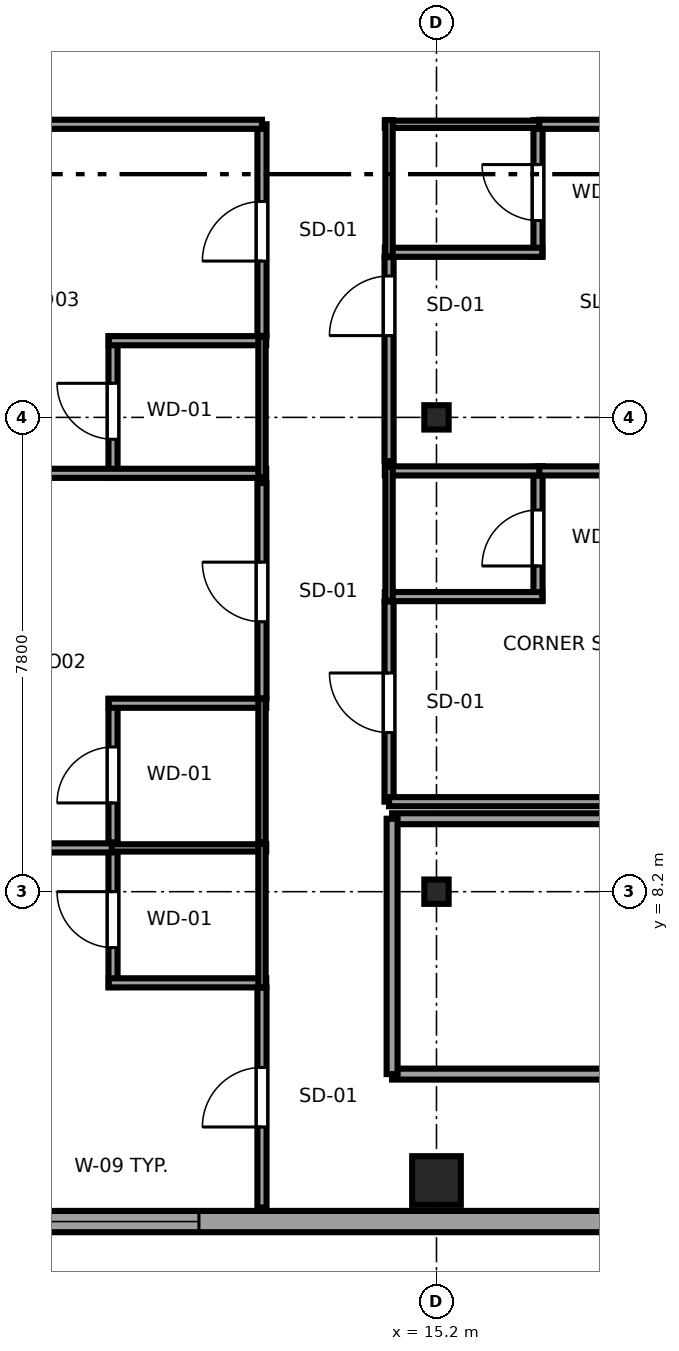
"""IFC4 building model, lengths in metres.
Left out: names, types, materials, properties, quantities, classifications, styles, units other than length and angle.
Written with IfcOpenShell. Run it as: python <this file> out.ifc"""

import sys

from ifc_helpers import new_model, si_unit, direction, frame, frame_2d, origin, origin_2d, place, context, subcontext, project, spatial, rectangle, i_section, extrude, source, transform, mapped, element, fill, save


model = new_model("IFC4")
c1 = context("Model", 3, precision=1e-05, world=origin(), true_north=direction((0.0, 1.0)))
c2 = subcontext(c1, "Body", "Model", "MODEL_VIEW")
j1 = project(units=[si_unit("LENGTHUNIT", "METRE"), si_unit("PLANEANGLEUNIT", "RADIAN")], contexts=[c1])
p1 = place(None, origin())
s1 = spatial("IfcSite", under=j1, at=p1, CompositionType="ELEMENT")
p2 = place(p1, origin())
s2 = spatial("IfcBuilding", under=s1, at=p2, CompositionType="ELEMENT")
p3 = place(p2, frame((0.0, 0.0, 171.9)))
s3 = spatial("IfcBuildingStorey", under=s2, at=p3, CompositionType="ELEMENT", Elevation=171.9)
m1 = source(origin(), c2, "Body", "SweptSolid", [
    extrude(rectangle(XDim=0.8, YDim=0.8, at=origin_2d()), origin(), (0.0, 0.0, 1.0), 3.55),
])
p4 = place(p3, frame((15.2, 3.45, 0.0), z_axis=(0.0, 0.0, 1.0), x_axis=(1.0, 0.0, 0.0)))
e1 = element("IfcColumn", 1, at=p4, inside=s3, PredefinedType="COLUMN", context=c2, shape_type="MappedRepresentation", body=[
    mapped(m1, transform((0.0, 0.0, 0.0), x_axis=(1.0, 0.0, 0.0), y_axis=(0.0, 1.0, 0.0), z_axis=(0.0, 0.0, 1.0), scale=1.0)),
])
m2 = source(origin(), c2, "Body", "SweptSolid", [
    extrude(i_section(OverallWidth=0.4, OverallDepth=0.4, WebThickness=0.02, FlangeThickness=0.035, at=origin_2d()), origin(), (0.0, 0.0, 1.0), 3.55),
])
for number, where, z_axis, x_axis in (
    (2, (15.2, 8.2, 0.0), (0.0, 0.0, 1.0), (1.0, 0.0, 0.0)),
    (3, (15.2, 16.0, 0.0), (0.0, 0.0, 1.0), (1.0, 0.0, 0.0)),
):
    element("IfcColumn", number, at=place(p3, frame(where, z_axis=z_axis, x_axis=x_axis)), inside=s3, PredefinedType="COLUMN", context=c2, shape_type="MappedRepresentation", body=[
        mapped(m2, transform((0.0, 0.0, 0.0), x_axis=(1.0, 0.0, 0.0), y_axis=(0.0, 1.0, 0.0), z_axis=(0.0, 0.0, 1.0), scale=1.0)),
    ])
p5 = place(p3, frame((7.017, 2.775, 0.0), z_axis=(0.0, 0.0, 1.0), x_axis=(1.0, 0.0, 0.0)))
e4 = element("IfcWall", 4, at=p5, inside=s3, PredefinedType="SOLIDWALL", context=c2, shape_type="SweptSolid", body=[
    extrude(rectangle(XDim=15.608, YDim=0.35, at=frame_2d((7.804, 0.0))), origin(), (0.0, 0.0, 1.0), 3.37),
])
p6 = place(p5, frame((1.726, 0.0, 0.68)))
e5 = element("IfcOpeningElement", 5, at=p6, cuts=e4, PredefinedType="OPENING", context=c2, shape_type="SweptSolid", body=[
    extrude(rectangle(XDim=2.55, YDim=1.92, at=frame_2d((1.275, 0.96))), frame((0.0, 0.185, 0.0), z_axis=(0.0, -1.0, 0.0), x_axis=(1.0, 0.0, 0.0)), (0.0, 0.0, 1.0), 0.37),
])
p7 = place(p5, frame((11.332, 0.0, 0.68)))
e6 = element("IfcOpeningElement", 6, at=p7, cuts=e4, PredefinedType="OPENING", context=c2, shape_type="SweptSolid", body=[
    extrude(rectangle(XDim=2.55, YDim=1.92, at=frame_2d((1.275, 0.96))), frame((0.0, 0.185, 0.0), z_axis=(0.0, -1.0, 0.0), x_axis=(1.0, 0.0, 0.0)), (0.0, 0.0, 1.0), 0.37),
])
p8 = place(p3, frame((9.88, 6.631, 0.0), z_axis=(0.0, 0.0, 1.0), x_axis=(0.0, 1.0, 0.0)))
e7 = element("IfcWall", 7, at=p8, inside=s3, PredefinedType="PARTITIONING", context=c2, shape_type="SweptSolid", body=[
    extrude(rectangle(XDim=2.359, YDim=0.15, at=frame_2d((1.179, 0.0))), origin(), (0.0, 0.0, 1.0), 3.37),
])
p9 = place(p8, frame((0.649, 0.0, 0.0)))
e8 = element("IfcOpeningElement", 8, at=p9, cuts=e7, PredefinedType="OPENING", context=c2, shape_type="SweptSolid", body=[
    extrude(rectangle(XDim=0.92, YDim=2.01, at=frame_2d((0.46, 1.005))), frame((0.0, 0.085, 0.0), z_axis=(0.0, -1.0, 0.0), x_axis=(1.0, 0.0, 0.0)), (0.0, 0.0, 1.0), 0.17),
])
p10 = place(p3, frame((9.81, 6.701, 0.0), z_axis=(0.0, 0.0, 1.0), x_axis=(1.0, 0.0, 0.0)))
e9 = element("IfcWall", 9, at=p10, inside=s3, PredefinedType="PARTITIONING", context=c2, shape_type="SweptSolid", body=[
    extrude(rectangle(XDim=2.59, YDim=0.15, at=frame_2d((1.295, 0.0))), origin(), (0.0, 0.0, 1.0), 3.37),
])
p11 = place(p3, frame((9.81, 8.92, 0.0), z_axis=(0.0, 0.0, 1.0), x_axis=(1.0, 0.0, 0.0)))
e10 = element("IfcWall", 10, at=p11, inside=s3, PredefinedType="PLUMBINGWALL", context=c2, shape_type="SweptSolid", body=[
    extrude(rectangle(XDim=2.59, YDim=0.12, at=frame_2d((1.295, 0.0))), origin(), (0.0, 0.0, 1.0), 3.37),
])
p12 = place(p3, frame((12.33, 6.631, 0.0), z_axis=(0.0, 0.0, 1.0), x_axis=(0.0, 1.0, 0.0)))
e11 = element("IfcWall", 11, at=p12, inside=s3, PredefinedType="PLUMBINGWALL", context=c2, shape_type="SweptSolid", body=[
    extrude(rectangle(XDim=2.359, YDim=0.12, at=frame_2d((1.179, 0.0))), origin(), (0.0, 0.0, 1.0), 3.37),
])
p13 = place(p3, frame((9.88, 9.01, 0.0), z_axis=(0.0, 0.0, 1.0), x_axis=(0.0, 1.0, 0.0)))
e12 = element("IfcWall", 12, at=p13, inside=s3, PredefinedType="PARTITIONING", context=c2, shape_type="SweptSolid", body=[
    extrude(rectangle(XDim=2.359, YDim=0.15, at=frame_2d((1.179, 0.0))), origin(), (0.0, 0.0, 1.0), 3.37),
])
p14 = place(p13, frame((0.649, 0.0, 0.0)))
e13 = element("IfcOpeningElement", 13, at=p14, cuts=e12, PredefinedType="OPENING", context=c2, shape_type="SweptSolid", body=[
    extrude(rectangle(XDim=0.92, YDim=2.01, at=frame_2d((0.46, 1.005))), frame((0.0, 0.085, 0.0), z_axis=(0.0, -1.0, 0.0), x_axis=(1.0, 0.0, 0.0)), (0.0, 0.0, 1.0), 0.17),
])
p15 = place(p3, frame((9.81, 11.299, 0.0), z_axis=(0.0, 0.0, 1.0), x_axis=(1.0, 0.0, 0.0)))
e14 = element("IfcWall", 14, at=p15, inside=s3, PredefinedType="PARTITIONING", context=c2, shape_type="SweptSolid", body=[
    extrude(rectangle(XDim=2.59, YDim=0.15, at=frame_2d((1.295, 0.0))), origin(), (0.0, 0.0, 1.0), 3.37),
])
p16 = place(p3, frame((12.33, 9.01, 0.0), z_axis=(0.0, 0.0, 1.0), x_axis=(0.0, 1.0, 0.0)))
e15 = element("IfcWall", 15, at=p16, inside=s3, PredefinedType="PLUMBINGWALL", context=c2, shape_type="SweptSolid", body=[
    extrude(rectangle(XDim=2.359, YDim=0.12, at=frame_2d((1.179, 0.0))), origin(), (0.0, 0.0, 1.0), 3.37),
])
p17 = place(p3, frame((9.88, 15.01, 0.0), z_axis=(0.0, 0.0, 1.0), x_axis=(0.0, 1.0, 0.0)))
e16 = element("IfcWall", 16, at=p17, inside=s3, PredefinedType="PARTITIONING", context=c2, shape_type="SweptSolid", body=[
    extrude(rectangle(XDim=2.321, YDim=0.15, at=frame_2d((1.161, 0.0))), origin(), (0.0, 0.0, 1.0), 3.37),
])
p18 = place(p17, frame((0.631, 0.0, 0.0)))
e17 = element("IfcOpeningElement", 17, at=p18, cuts=e16, PredefinedType="OPENING", context=c2, shape_type="SweptSolid", body=[
    extrude(rectangle(XDim=0.92, YDim=2.01, at=frame_2d((0.46, 1.005))), frame((0.0, 0.085, 0.0), z_axis=(0.0, -1.0, 0.0), x_axis=(1.0, 0.0, 0.0)), (0.0, 0.0, 1.0), 0.17),
])
p19 = place(p3, frame((3.005, 15.08, 0.0), z_axis=(0.0, 0.0, 1.0), x_axis=(1.0, 0.0, 0.0)))
e18 = element("IfcWall", 18, at=p19, inside=s3, PredefinedType="PARTITIONING", context=c2, shape_type="SweptSolid", body=[
    extrude(rectangle(XDim=9.395, YDim=0.15, at=frame_2d((4.698, 0.0))), origin(), (0.0, 0.0, 1.0), 3.37),
])
p20 = place(p3, frame((9.81, 17.261, 0.0), z_axis=(0.0, 0.0, 1.0), x_axis=(1.0, 0.0, 0.0)))
e19 = element("IfcWall", 19, at=p20, inside=s3, PredefinedType="PARTITIONING", context=c2, shape_type="SweptSolid", body=[
    extrude(rectangle(XDim=2.59, YDim=0.15, at=frame_2d((1.295, 0.0))), origin(), (0.0, 0.0, 1.0), 3.37),
])
p21 = place(p3, frame((12.33, 15.01, 0.0), z_axis=(0.0, 0.0, 1.0), x_axis=(0.0, 1.0, 0.0)))
e20 = element("IfcWall", 20, at=p21, inside=s3, PredefinedType="PLUMBINGWALL", context=c2, shape_type="SweptSolid", body=[
    extrude(rectangle(XDim=2.321, YDim=0.12, at=frame_2d((1.161, 0.0))), origin(), (0.0, 0.0, 1.0), 3.37),
])
p22 = place(p3, frame((16.87, 12.983, 0.0), z_axis=(0.0, 0.0, 1.0), x_axis=(0.0, 1.0, 0.0)))
e21 = element("IfcWall", 21, at=p22, inside=s3, PredefinedType="PARTITIONING", context=c2, shape_type="SweptSolid", body=[
    extrude(rectangle(XDim=2.207, YDim=0.15, at=frame_2d((1.104, 0.0))), origin(), (0.0, 0.0, 1.0), 3.37),
])
p23 = place(p22, frame((0.573, 0.0, 0.0)))
e22 = element("IfcOpeningElement", 22, at=p23, cuts=e21, PredefinedType="OPENING", context=c2, shape_type="SweptSolid", body=[
    extrude(rectangle(XDim=0.92, YDim=2.01, at=frame_2d((0.46, 1.005))), frame((0.0, 0.085, 0.0), z_axis=(0.0, -1.0, 0.0), x_axis=(1.0, 0.0, 0.0)), (0.0, 0.0, 1.0), 0.17),
])
for number, where, z_axis, x_axis in (
    (23, (14.35, 13.053, 0.0), (0.0, 0.0, 1.0), (1.0, 0.0, 0.0)),
    (24, (14.35, 15.12, 0.0), (0.0, 0.0, 1.0), (1.0, 0.0, 0.0)),
):
    element("IfcWall", number, at=place(p3, frame(where, z_axis=z_axis, x_axis=x_axis)), inside=s3, PredefinedType="PARTITIONING", context=c2, shape_type="SweptSolid", body=[
        extrude(rectangle(XDim=2.59, YDim=0.15, at=frame_2d((1.295, 0.0))), origin(), (0.0, 0.0, 1.0), 3.37),
    ])
p24 = place(p3, frame((14.42, 12.983, 0.0), z_axis=(0.0, 0.0, 1.0), x_axis=(0.0, 1.0, 0.0)))
e25 = element("IfcWall", 25, at=p24, inside=s3, PredefinedType="PLUMBINGWALL", context=c2, shape_type="SweptSolid", body=[
    extrude(rectangle(XDim=2.207, YDim=0.12, at=frame_2d((1.104, 0.0))), origin(), (0.0, 0.0, 1.0), 3.37),
])
p25 = place(p3, frame((16.87, 18.645, 0.0), z_axis=(0.0, 0.0, 1.0), x_axis=(0.0, 1.0, 0.0)))
e26 = element("IfcWall", 26, at=p25, inside=s3, PredefinedType="PARTITIONING", context=c2, shape_type="SweptSolid", body=[
    extrude(rectangle(XDim=2.245, YDim=0.15, at=frame_2d((1.123, 0.0))), origin(), (0.0, 0.0, 1.0), 3.37),
])
p26 = place(p25, frame((0.593, 0.0, 0.0)))
e27 = element("IfcOpeningElement", 27, at=p26, cuts=e26, PredefinedType="OPENING", context=c2, shape_type="SweptSolid", body=[
    extrude(rectangle(XDim=0.92, YDim=2.01, at=frame_2d((0.46, 1.005))), frame((0.0, 0.085, 0.0), z_axis=(0.0, -1.0, 0.0), x_axis=(1.0, 0.0, 0.0)), (0.0, 0.0, 1.0), 0.17),
])
p27 = place(p3, frame((14.35, 18.715, 0.0), z_axis=(0.0, 0.0, 1.0), x_axis=(1.0, 0.0, 0.0)))
e28 = element("IfcWall", 28, at=p27, inside=s3, PredefinedType="PARTITIONING", context=c2, shape_type="SweptSolid", body=[
    extrude(rectangle(XDim=2.59, YDim=0.15, at=frame_2d((1.295, 0.0))), origin(), (0.0, 0.0, 1.0), 3.37),
])
p28 = place(p3, frame((14.35, 20.82, 0.0), z_axis=(0.0, 0.0, 1.0), x_axis=(1.0, 0.0, 0.0)))
e29 = element("IfcWall", 29, at=p28, inside=s3, PredefinedType="PLUMBINGWALL", context=c2, shape_type="SweptSolid", body=[
    extrude(rectangle(XDim=2.59, YDim=0.12, at=frame_2d((1.295, 0.0))), origin(), (0.0, 0.0, 1.0), 3.37),
])
p29 = place(p3, frame((14.42, 18.645, 0.0), z_axis=(0.0, 0.0, 1.0), x_axis=(0.0, 1.0, 0.0)))
e30 = element("IfcWall", 30, at=p29, inside=s3, PredefinedType="PLUMBINGWALL", context=c2, shape_type="SweptSolid", body=[
    extrude(rectangle(XDim=2.245, YDim=0.12, at=frame_2d((1.123, 0.0))), origin(), (0.0, 0.0, 1.0), 3.37),
])
p30 = place(p3, frame((12.33, 3.005, 0.0), z_axis=(0.0, 0.0, 1.0), x_axis=(0.0, 1.0, 0.0)))
e31 = element("IfcWall", 31, at=p30, inside=s3, PredefinedType="PARTITIONING", context=c2, shape_type="SweptSolid", body=[
    extrude(rectangle(XDim=3.616, YDim=0.15, at=frame_2d((1.808, 0.0))), origin(), (0.0, 0.0, 1.0), 3.37),
])
p31 = place(p30, frame((1.325, 0.0, 0.0)))
e32 = element("IfcOpeningElement", 32, at=p31, cuts=e31, PredefinedType="OPENING", context=c2, shape_type="SweptSolid", body=[
    extrude(rectangle(XDim=0.98, YDim=2.12, at=frame_2d((0.49, 1.06))), frame((0.0, 0.085, 0.0), z_axis=(0.0, -1.0, 0.0), x_axis=(1.0, 0.0, 0.0)), (0.0, 0.0, 1.0), 0.17),
])
p32 = place(p3, frame((3.005, 8.92, 0.0), z_axis=(0.0, 0.0, 1.0), x_axis=(1.0, 0.0, 0.0)))
e33 = element("IfcWall", 33, at=p32, inside=s3, PredefinedType="PARTITIONING", context=c2, shape_type="SweptSolid", body=[
    extrude(rectangle(XDim=6.855, YDim=0.15, at=frame_2d((3.428, 0.0))), origin(), (0.0, 0.0, 1.0), 3.37),
])
p33 = place(p3, frame((12.33, 11.379, 0.0), z_axis=(0.0, 0.0, 1.0), x_axis=(0.0, 1.0, 0.0)))
e34 = element("IfcWall", 34, at=p33, inside=s3, PredefinedType="PARTITIONING", context=c2, shape_type="SweptSolid", body=[
    extrude(rectangle(XDim=3.541, YDim=0.15, at=frame_2d((1.771, 0.0))), origin(), (0.0, 0.0, 1.0), 3.37),
])
p34 = place(p33, frame((1.26, 0.0, 0.0)))
e35 = element("IfcOpeningElement", 35, at=p34, cuts=e34, PredefinedType="OPENING", context=c2, shape_type="SweptSolid", body=[
    extrude(rectangle(XDim=0.98, YDim=2.12, at=frame_2d((0.49, 1.06))), frame((0.0, 0.085, 0.0), z_axis=(0.0, -1.0, 0.0), x_axis=(1.0, 0.0, 0.0)), (0.0, 0.0, 1.0), 0.17),
])
p35 = place(p3, frame((12.33, 17.341, 0.0), z_axis=(0.0, 0.0, 1.0), x_axis=(0.0, 1.0, 0.0)))
e36 = element("IfcWall", 36, at=p35, inside=s3, PredefinedType="PARTITIONING", context=c2, shape_type="SweptSolid", body=[
    extrude(rectangle(XDim=3.479, YDim=0.15, at=frame_2d((1.74, 0.0))), origin(), (0.0, 0.0, 1.0), 3.37),
])
p36 = place(p35, frame((1.229, 0.0, 0.0)))
e37 = element("IfcOpeningElement", 37, at=p36, cuts=e36, PredefinedType="OPENING", context=c2, shape_type="SweptSolid", body=[
    extrude(rectangle(XDim=0.98, YDim=2.12, at=frame_2d((0.49, 1.06))), frame((0.0, 0.085, 0.0), z_axis=(0.0, -1.0, 0.0), x_axis=(1.0, 0.0, 0.0)), (0.0, 0.0, 1.0), 0.17),
])
p37 = place(p3, frame((3.005, 20.82, 0.0), z_axis=(0.0, 0.0, 1.0), x_axis=(1.0, 0.0, 0.0)))
e38 = element("IfcWall", 38, at=p37, inside=s3, PredefinedType="PARTITIONING", context=c2, shape_type="SweptSolid", body=[
    extrude(rectangle(XDim=9.325, YDim=0.15, at=frame_2d((4.663, 0.0))), origin(), (0.0, 0.0, 1.0), 3.37),
])
p38 = place(p3, frame((14.42, 9.68, 0.0), z_axis=(0.0, 0.0, 1.0), x_axis=(0.0, 1.0, 0.0)))
e39 = element("IfcWall", 39, at=p38, inside=s3, PredefinedType="PARTITIONING", context=c2, shape_type="SweptSolid", body=[
    extrude(rectangle(XDim=3.293, YDim=0.15, at=frame_2d((1.646, 0.0))), origin(), (0.0, 0.0, 1.0), 3.37),
])
p39 = place(p38, frame((1.136, 0.0, 0.0)))
e40 = element("IfcOpeningElement", 40, at=p39, cuts=e39, PredefinedType="OPENING", context=c2, shape_type="SweptSolid", body=[
    extrude(rectangle(XDim=0.98, YDim=2.12, at=frame_2d((0.49, 1.06))), frame((0.0, 0.085, 0.0), z_axis=(0.0, -1.0, 0.0), x_axis=(1.0, 0.0, 0.0)), (0.0, 0.0, 1.0), 0.17),
])
p40 = place(p3, frame((14.42, 9.68, 0.0), z_axis=(0.0, 0.0, 1.0), x_axis=(1.0, 0.0, 0.0)))
e41 = element("IfcWall", 41, at=p40, inside=s3, PredefinedType="PARTITIONING", context=c2, shape_type="SweptSolid", body=[
    extrude(rectangle(XDim=7.93, YDim=0.15, at=frame_2d((3.965, 0.0))), origin(), (0.0, 0.0, 1.0), 3.37),
])
p41 = place(p3, frame((16.89, 15.12, 0.0), z_axis=(0.0, 0.0, 1.0), x_axis=(1.0, 0.0, 0.0)))
e42 = element("IfcWall", 42, at=p41, inside=s3, PredefinedType="PARTITIONING", context=c2, shape_type="SweptSolid", body=[
    extrude(rectangle(XDim=5.46, YDim=0.15, at=frame_2d((2.73, 0.0))), origin(), (0.0, 0.0, 1.0), 3.37),
])
p42 = place(p3, frame((14.42, 15.28, 0.0), z_axis=(0.0, 0.0, 1.0), x_axis=(0.0, 1.0, 0.0)))
e43 = element("IfcWall", 43, at=p42, inside=s3, PredefinedType="PARTITIONING", context=c2, shape_type="SweptSolid", body=[
    extrude(rectangle(XDim=3.355, YDim=0.15, at=frame_2d((1.677, 0.0))), origin(), (0.0, 0.0, 1.0), 3.37),
])
p43 = place(p42, frame((2.065, 0.0, 0.0)))
e44 = element("IfcOpeningElement", 44, at=p43, cuts=e43, PredefinedType="OPENING", context=c2, shape_type="SweptSolid", body=[
    extrude(rectangle(XDim=0.98, YDim=2.12, at=frame_2d((0.49, 1.06))), frame((0.0, 0.085, 0.0), z_axis=(0.0, -1.0, 0.0), x_axis=(1.0, 0.0, 0.0)), (0.0, 0.0, 1.0), 0.17),
])
p44 = place(p3, frame((16.89, 20.82, 0.0), z_axis=(0.0, 0.0, 1.0), x_axis=(1.0, 0.0, 0.0)))
e45 = element("IfcWall", 45, at=p44, inside=s3, PredefinedType="PARTITIONING", context=c2, shape_type="SweptSolid", body=[
    extrude(rectangle(XDim=5.46, YDim=0.15, at=frame_2d((2.73, 0.0))), origin(), (0.0, 0.0, 1.0), 3.37),
])
for number, where, z_axis, x_axis in (
    (46, (14.47, 5.2, 0.0), (0.0, 0.0, 1.0), (1.0, 0.0, 0.0)),
    (47, (14.47, 9.4, 0.0), (0.0, 0.0, 1.0), (1.0, 0.0, 0.0)),
):
    element("IfcWall", number, at=place(p3, frame(where, z_axis=z_axis, x_axis=x_axis)), inside=s3, PredefinedType="PARTITIONING", context=c2, shape_type="SweptSolid", body=[
        extrude(rectangle(XDim=28.51, YDim=0.18, at=frame_2d((14.255, 0.0))), origin(), (0.0, 0.0, 1.0), 3.37),
    ])
p45 = place(p3, frame((14.47, 5.2, 0.0), z_axis=(0.0, 0.0, 1.0), x_axis=(0.0, 1.0, 0.0)))
e48 = element("IfcWall", 48, at=p45, inside=s3, PredefinedType="PARTITIONING", context=c2, shape_type="SweptSolid", body=[
    extrude(rectangle(XDim=4.2, YDim=0.18, at=frame_2d((2.1, 0.0))), origin(), (0.0, 0.0, 1.0), 3.37),
])
m3 = source(origin(), c2, "Body", "SweptSolid", [
    extrude(rectangle(XDim=2.55, YDim=1.92, at=frame_2d((1.275, 0.96))), frame((0.0, 0.09, 0.0), z_axis=(0.0, -1.0, 0.0), x_axis=(1.0, 0.0, 0.0)), (0.0, 0.0, 1.0), 0.06),
])
p46 = place(p6, origin())
e49 = element("IfcWindow", 49, at=p46, inside=s3, PartitioningType="TRIPLE_PANEL_HORIZONTAL", PredefinedType="WINDOW", context=c2, shape_type="MappedRepresentation", body=[
    mapped(m3, transform((0.0, 0.0, 0.0), x_axis=(1.0, 0.0, 0.0), y_axis=(0.0, 1.0, 0.0), z_axis=(0.0, 0.0, 1.0), scale=1.0)),
])
fill(e5, e49)
m4 = source(origin(), c2, "Body", "SweptSolid", [
    extrude(rectangle(XDim=0.92, YDim=2.01, at=frame_2d((0.46, 1.005))), frame((0.0, 0.025, 0.0), z_axis=(0.0, -1.0, 0.0), x_axis=(1.0, 0.0, 0.0)), (0.0, 0.0, 1.0), 0.05),
])
p47 = place(p9, origin())
e50 = element("IfcDoor", 50, at=p47, inside=s3, OperationType="SINGLE_SWING_RIGHT", PredefinedType="DOOR", context=c2, shape_type="MappedRepresentation", body=[
    mapped(m4, transform((0.0, 0.0, 0.0), x_axis=(1.0, 0.0, 0.0), y_axis=(0.0, 1.0, 0.0), z_axis=(0.0, 0.0, 1.0), scale=1.0)),
])
fill(e8, e50)
p48 = place(p14, origin())
e51 = element("IfcDoor", 51, at=p48, inside=s3, OperationType="SINGLE_SWING_LEFT", PredefinedType="DOOR", context=c2, shape_type="MappedRepresentation", body=[
    mapped(m4, transform((0.0, 0.0, 0.0), x_axis=(1.0, 0.0, 0.0), y_axis=(0.0, 1.0, 0.0), z_axis=(0.0, 0.0, 1.0), scale=1.0)),
])
fill(e13, e51)
p49 = place(p18, origin())
e52 = element("IfcDoor", 52, at=p49, inside=s3, OperationType="SINGLE_SWING_RIGHT", PredefinedType="DOOR", context=c2, shape_type="MappedRepresentation", body=[
    mapped(m4, transform((0.0, 0.0, 0.0), x_axis=(1.0, 0.0, 0.0), y_axis=(0.0, 1.0, 0.0), z_axis=(0.0, 0.0, 1.0), scale=1.0)),
])
fill(e17, e52)
p50 = place(p23, origin())
e53 = element("IfcDoor", 53, at=p50, inside=s3, OperationType="SINGLE_SWING_LEFT", PredefinedType="DOOR", context=c2, shape_type="MappedRepresentation", body=[
    mapped(m4, transform((0.0, 0.0, 0.0), x_axis=(1.0, 0.0, 0.0), y_axis=(0.0, 1.0, 0.0), z_axis=(0.0, 0.0, 1.0), scale=1.0)),
])
fill(e22, e53)
p51 = place(p26, origin())
e54 = element("IfcDoor", 54, at=p51, inside=s3, OperationType="SINGLE_SWING_RIGHT", PredefinedType="DOOR", context=c2, shape_type="MappedRepresentation", body=[
    mapped(m4, transform((0.0, 0.0, 0.0), x_axis=(1.0, 0.0, 0.0), y_axis=(0.0, 1.0, 0.0), z_axis=(0.0, 0.0, 1.0), scale=1.0)),
])
fill(e27, e54)
m5 = source(origin(), c2, "Body", "SweptSolid", [
    extrude(rectangle(XDim=0.98, YDim=2.12, at=frame_2d((0.49, 1.06))), frame((0.0, 0.025, 0.0), z_axis=(0.0, -1.0, 0.0), x_axis=(1.0, 0.0, 0.0)), (0.0, 0.0, 1.0), 0.05),
])
p52 = place(p31, origin())
e55 = element("IfcDoor", 55, at=p52, inside=s3, OperationType="SINGLE_SWING_LEFT", PredefinedType="DOOR", context=c2, shape_type="MappedRepresentation", body=[
    mapped(m5, transform((0.0, 0.0, 0.0), x_axis=(1.0, 0.0, 0.0), y_axis=(0.0, 1.0, 0.0), z_axis=(0.0, 0.0, 1.0), scale=1.0)),
])
fill(e32, e55)
p53 = place(p34, origin())
e56 = element("IfcDoor", 56, at=p53, inside=s3, OperationType="SINGLE_SWING_RIGHT", PredefinedType="DOOR", context=c2, shape_type="MappedRepresentation", body=[
    mapped(m5, transform((0.0, 0.0, 0.0), x_axis=(1.0, 0.0, 0.0), y_axis=(0.0, 1.0, 0.0), z_axis=(0.0, 0.0, 1.0), scale=1.0)),
])
fill(e35, e56)
p54 = place(p36, origin())
e57 = element("IfcDoor", 57, at=p54, inside=s3, OperationType="SINGLE_SWING_LEFT", PredefinedType="DOOR", context=c2, shape_type="MappedRepresentation", body=[
    mapped(m5, transform((0.0, 0.0, 0.0), x_axis=(1.0, 0.0, 0.0), y_axis=(0.0, 1.0, 0.0), z_axis=(0.0, 0.0, 1.0), scale=1.0)),
])
fill(e37, e57)
p55 = place(p39, origin())
e58 = element("IfcDoor", 58, at=p55, inside=s3, OperationType="SINGLE_SWING_RIGHT", PredefinedType="DOOR", context=c2, shape_type="MappedRepresentation", body=[
    mapped(m5, transform((0.0, 0.0, 0.0), x_axis=(1.0, 0.0, 0.0), y_axis=(0.0, 1.0, 0.0), z_axis=(0.0, 0.0, 1.0), scale=1.0)),
])
fill(e40, e58)
p56 = place(p43, origin())
e59 = element("IfcDoor", 59, at=p56, inside=s3, OperationType="SINGLE_SWING_LEFT", PredefinedType="DOOR", context=c2, shape_type="MappedRepresentation", body=[
    mapped(m5, transform((0.0, 0.0, 0.0), x_axis=(1.0, 0.0, 0.0), y_axis=(0.0, 1.0, 0.0), z_axis=(0.0, 0.0, 1.0), scale=1.0)),
])
fill(e44, e59)
save(model, sys.argv[1])
